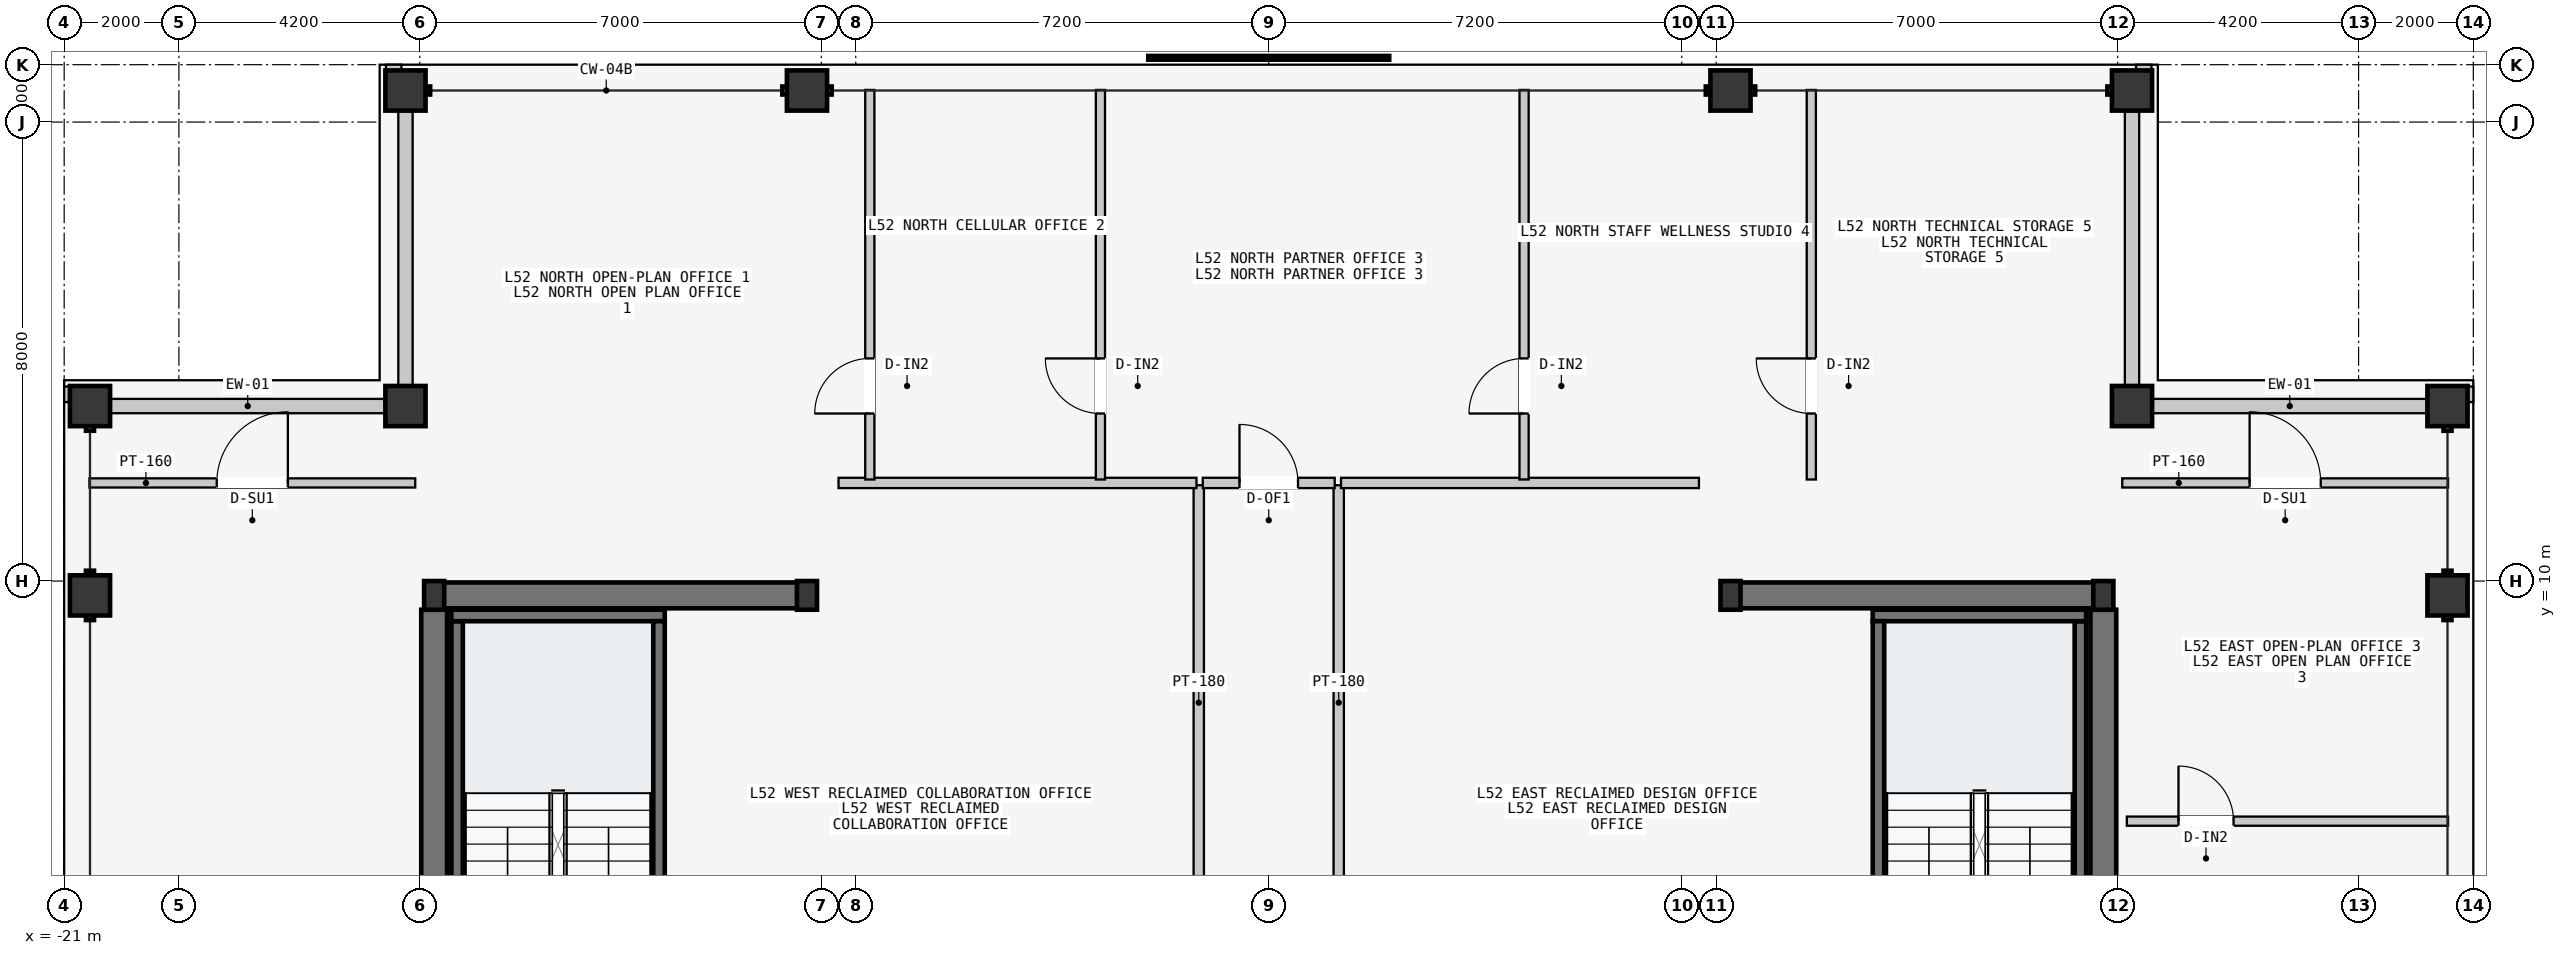
"""IFC4 building model, lengths in metres.
Left out: names, types, materials, properties, quantities, classifications, styles, units other than length and angle.
Written with IfcOpenShell. Run it as: python <this file> out.ifc"""

import sys

from ifc_helpers import new_model, si_unit, direction, frame, frame_2d, origin, origin_2d, place, context, subcontext, project, spatial, rectangle, hollow_rectangle, i_section, extrude, element, fill, save


model = new_model("IFC4")
c1 = context("Model", 3, precision=1e-05, world=origin(), true_north=direction((0.0, 1.0)))
c2 = subcontext(c1, "Body", "Model", "MODEL_VIEW")
j1 = project(units=[si_unit("LENGTHUNIT", "METRE"), si_unit("PLANEANGLEUNIT", "RADIAN")], contexts=[c1])
p1 = place(None, origin())
s1 = spatial("IfcSite", under=j1, at=p1, CompositionType="ELEMENT")
p2 = place(p1, origin())
s2 = spatial("IfcBuilding", under=s1, at=p2, CompositionType="ELEMENT")
p3 = place(p2, frame((0.0, 0.0, 198.3)))
s3 = spatial("IfcBuildingStorey", under=s2, at=p3, CompositionType="ELEMENT", Elevation=198.3)
p4 = place(p3, frame((-14.53, 9.75, -0.2), z_axis=(0.0, 0.0, 1.0), x_axis=(1.0, 0.0, 0.0)))
e1 = element("IfcWall", 1, at=p4, inside=s3, PredefinedType="SHEAR", context=c2, shape_type="SweptSolid", body=[
    extrude(rectangle(XDim=6.46, YDim=0.45, at=frame_2d((3.23, 0.0))), origin(), (0.0, 0.0, 1.0), 3.6),
])
p5 = place(p3, frame((-14.55, 0.25, -0.2), z_axis=(0.0, 0.0, 1.0), x_axis=(0.0, 1.0, 0.0)))
e2 = element("IfcWall", 2, at=p5, inside=s3, PredefinedType="SHEAR", context=c2, shape_type="SweptSolid", body=[
    extrude(rectangle(XDim=9.25, YDim=0.45, at=frame_2d((4.625, 0.0))), origin(), (0.0, 0.0, 1.0), 3.6),
])
p6 = place(p3, frame((8.07, 9.75, -0.2), z_axis=(0.0, 0.0, 1.0), x_axis=(1.0, 0.0, 0.0)))
e3 = element("IfcWall", 3, at=p6, inside=s3, PredefinedType="SHEAR", context=c2, shape_type="SweptSolid", body=[
    extrude(rectangle(XDim=6.46, YDim=0.45, at=frame_2d((3.23, 0.0))), origin(), (0.0, 0.0, 1.0), 3.6),
])
p7 = place(p3, frame((14.55, 0.25, -0.2), z_axis=(0.0, 0.0, 1.0), x_axis=(0.0, 1.0, 0.0)))
e4 = element("IfcWall", 4, at=p7, inside=s3, PredefinedType="SHEAR", context=c2, shape_type="SweptSolid", body=[
    extrude(rectangle(XDim=9.25, YDim=0.45, at=frame_2d((4.625, 0.0))), origin(), (0.0, 0.0, 1.0), 3.6),
])
for number, where, z_axis, x_axis in (
    (5, (-14.15, 1.5, -0.2), (0.0, 0.0, 1.0), (0.0, 1.0, 0.0)),
    (6, (14.15, 1.5, -0.2), (0.0, 0.0, 1.0), (0.0, 1.0, 0.0)),
):
    element("IfcWall", number, at=place(p3, frame(where, z_axis=z_axis, x_axis=x_axis)), inside=s3, PredefinedType="SOLIDWALL", context=c2, shape_type="SweptSolid", body=[
        extrude(rectangle(XDim=7.8, YDim=0.2, at=frame_2d((3.9, 0.0))), origin(), (0.0, 0.0, 1.0), 3.6),
    ])
p8 = place(p3, frame((-14.25, 9.4, -0.2), z_axis=(0.0, 0.0, 1.0), x_axis=(1.0, 0.0, 0.0)))
e7 = element("IfcWall", 7, at=p8, inside=s3, PredefinedType="SOLIDWALL", context=c2, shape_type="SweptSolid", body=[
    extrude(rectangle(XDim=3.72, YDim=0.2, at=frame_2d((1.86, 0.0))), origin(), (0.0, 0.0, 1.0), 3.6),
])
p9 = place(p3, frame((-10.63, 1.5, -0.2), z_axis=(0.0, 0.0, 1.0), x_axis=(0.0, 1.0, 0.0)))
e8 = element("IfcWall", 8, at=p9, inside=s3, PredefinedType="SOLIDWALL", context=c2, shape_type="SweptSolid", body=[
    extrude(rectangle(XDim=7.8, YDim=0.2, at=frame_2d((3.9, 0.0))), origin(), (0.0, 0.0, 1.0), 3.6),
])
p10 = place(p3, frame((10.53, 9.4, -0.2), z_axis=(0.0, 0.0, 1.0), x_axis=(1.0, 0.0, 0.0)))
e9 = element("IfcWall", 9, at=p10, inside=s3, PredefinedType="SOLIDWALL", context=c2, shape_type="SweptSolid", body=[
    extrude(rectangle(XDim=3.72, YDim=0.2, at=frame_2d((1.86, 0.0))), origin(), (0.0, 0.0, 1.0), 3.6),
])
p11 = place(p3, frame((10.63, 1.5, -0.2), z_axis=(0.0, 0.0, 1.0), x_axis=(0.0, 1.0, 0.0)))
e10 = element("IfcWall", 10, at=p11, inside=s3, PredefinedType="SOLIDWALL", context=c2, shape_type="SweptSolid", body=[
    extrude(rectangle(XDim=7.8, YDim=0.2, at=frame_2d((3.9, 0.0))), origin(), (0.0, 0.0, 1.0), 3.6),
])
for number, where, z_axis, x_axis in (
    (11, (-14.55, 9.75, 0.0), (0.0, 0.0, 1.0), (1.0, 0.0, 0.0)),
    (12, (-8.05, 9.75, 0.0), (0.0, 0.0, 1.0), (1.0, 0.0, 0.0)),
    (13, (8.05, 9.75, 0.0), (0.0, 0.0, 1.0), (1.0, 0.0, 0.0)),
    (14, (14.55, 9.75, 0.0), (0.0, 0.0, 1.0), (1.0, 0.0, 0.0)),
):
    element("IfcColumn", number, at=place(p3, frame(where, z_axis=z_axis, x_axis=x_axis)), inside=s3, PredefinedType="COLUMN", context=c2, shape_type="SweptSolid", body=[
        extrude(i_section(OverallWidth=0.35, OverallDepth=0.5, WebThickness=0.02, FlangeThickness=0.032, at=origin_2d()), origin(), (0.0, 0.0, 1.0), 3.6),
    ])
for number, where, z_axis, x_axis in (
    (15, (-15.05, 18.55, 0.0), (0.0, 0.0, 1.0), (1.0, 0.0, 0.0)),
    (16, (-8.05, 18.55, 0.0), (0.0, 0.0, 1.0), (1.0, 0.0, 0.0)),
    (17, (8.05, 18.55, 0.0), (0.0, 0.0, 1.0), (1.0, 0.0, 0.0)),
    (18, (15.05, 18.55, 0.0), (0.0, 0.0, 1.0), (1.0, 0.0, 0.0)),
    (19, (-20.55, 9.75, 0.0), (0.0, 0.0, 1.0), (0.0, 1.0, 0.0)),
    (20, (-20.55, 13.05, 0.0), (0.0, 0.0, 1.0), (0.0, 1.0, 0.0)),
    (21, (20.55, 9.75, 0.0), (0.0, 0.0, 1.0), (0.0, 1.0, 0.0)),
    (22, (20.55, 13.05, 0.0), (0.0, 0.0, 1.0), (0.0, 1.0, 0.0)),
    (23, (-15.05, 13.05, 0.0), (0.0, 0.0, 1.0), (1.0, 0.0, 0.0)),
    (24, (15.05, 13.05, 0.0), (0.0, 0.0, 1.0), (1.0, 0.0, 0.0)),
):
    element("IfcColumn", number, at=place(p3, frame(where, z_axis=z_axis, x_axis=x_axis)), inside=s3, PredefinedType="COLUMN", context=c2, shape_type="SweptSolid", body=[
        extrude(hollow_rectangle(XDim=0.7, YDim=0.7, WallThickness=0.03, at=origin_2d()), origin(), (0.0, 0.0, 1.0), 3.6),
    ])
for number, where, z_axis, x_axis in (
    (25, (-20.19, 13.05, 0.0), (0.0, 0.0, 1.0), (1.0, 0.0, 0.0)),
    (26, (-15.05, 13.41, 0.0), (0.0, 0.0, 1.0), (0.0, 1.0, 0.0)),
    (27, (15.41, 13.05, 0.0), (0.0, 0.0, 1.0), (1.0, 0.0, 0.0)),
    (28, (15.05, 13.41, 0.0), (0.0, 0.0, 1.0), (0.0, 1.0, 0.0)),
):
    element("IfcWall", number, at=place(p3, frame(where, z_axis=z_axis, x_axis=x_axis)), inside=s3, PredefinedType="STANDARD", context=c2, shape_type="SweptSolid", body=[
        extrude(rectangle(XDim=4.78, YDim=0.25, at=frame_2d((2.39, 0.0))), origin(), (0.0, 0.0, 1.0), 2.75),
    ])
for number, where, z_axis, x_axis in (
    (29, (-15.39, 18.89, 0.0), (0.0, 0.0, 1.0), (1.0, 0.0, 0.0)),
    (30, (-20.89, 13.12, 0.0), (0.0, 0.0, 1.0), (0.0, 1.0, 0.0)),
    (31, (15.12, 18.89, 0.0), (0.0, 0.0, 1.0), (1.0, 0.0, 0.0)),
    (32, (20.89, 13.12, 0.0), (0.0, 0.0, 1.0), (0.0, 1.0, 0.0)),
):
    element("IfcWall", number, at=place(p3, frame(where, z_axis=z_axis, x_axis=x_axis)), inside=s3, PredefinedType="PARAPET", context=c2, shape_type="SweptSolid", body=[
        extrude(rectangle(XDim=0.27, YDim=0.22, at=frame_2d((0.135, 0.0))), origin(), (0.0, 0.0, 1.0), 1.2),
    ])
p12 = place(p3, frame((-1.22, -3.5, 0.0), z_axis=(0.0, 0.0, 1.0), x_axis=(0.0, 1.0, 0.0)))
e33 = element("IfcWall", 33, at=p12, inside=s3, PredefinedType="PARTITIONING", context=c2, shape_type="SweptSolid", body=[
    extrude(rectangle(XDim=15.17, YDim=0.18, at=frame_2d((7.585, 0.0))), origin(), (0.0, 0.0, 1.0), 3.4),
])
p13 = place(p12, frame((6.1, 0.0, 0.0)))
e34 = element("IfcOpeningElement", 34, at=p13, cuts=e33, PredefinedType="OPENING", context=c2, shape_type="SweptSolid", body=[
    extrude(rectangle(XDim=1.24, YDim=2.24, at=frame_2d((0.62, 1.12))), frame((0.0, 0.1, 0.0), z_axis=(0.0, -1.0, 0.0), x_axis=(1.0, 0.0, 0.0)), (0.0, 0.0, 1.0), 0.2),
])
p14 = place(p12, frame((1.6, 0.0, 0.0)))
e35 = element("IfcOpeningElement", 35, at=p14, cuts=e33, PredefinedType="OPENING", context=c2, shape_type="SweptSolid", body=[
    extrude(rectangle(XDim=0.96, YDim=2.18, at=frame_2d((0.48, 1.09))), frame((0.0, 0.1, 0.0), z_axis=(0.0, -1.0, 0.0), x_axis=(1.0, 0.0, 0.0)), (0.0, 0.0, 1.0), 0.2),
])
p15 = place(p3, frame((-7.5, 11.71, 0.0), z_axis=(0.0, 0.0, 1.0), x_axis=(1.0, 0.0, 0.0)))
e36 = element("IfcWall", 36, at=p15, inside=s3, PredefinedType="PARTITIONING", context=c2, shape_type="SweptSolid", body=[
    extrude(rectangle(XDim=6.24, YDim=0.18, at=frame_2d((3.12, 0.0))), origin(), (0.0, 0.0, 1.0), 3.4),
])
p16 = place(p3, frame((1.22, -3.5, 0.0), z_axis=(0.0, 0.0, 1.0), x_axis=(0.0, 1.0, 0.0)))
e37 = element("IfcWall", 37, at=p16, inside=s3, PredefinedType="PARTITIONING", context=c2, shape_type="SweptSolid", body=[
    extrude(rectangle(XDim=15.17, YDim=0.18, at=frame_2d((7.585, 0.0))), origin(), (0.0, 0.0, 1.0), 3.4),
])
p17 = place(p16, frame((6.1, 0.0, 0.0)))
e38 = element("IfcOpeningElement", 38, at=p17, cuts=e37, PredefinedType="OPENING", context=c2, shape_type="SweptSolid", body=[
    extrude(rectangle(XDim=1.24, YDim=2.24, at=frame_2d((0.62, 1.12))), frame((0.0, 0.1, 0.0), z_axis=(0.0, -1.0, 0.0), x_axis=(1.0, 0.0, 0.0)), (0.0, 0.0, 1.0), 0.2),
])
p18 = place(p16, frame((1.6, 0.0, 0.0)))
e39 = element("IfcOpeningElement", 39, at=p18, cuts=e37, PredefinedType="OPENING", context=c2, shape_type="SweptSolid", body=[
    extrude(rectangle(XDim=0.96, YDim=2.18, at=frame_2d((0.48, 1.09))), frame((0.0, 0.1, 0.0), z_axis=(0.0, -1.0, 0.0), x_axis=(1.0, 0.0, 0.0)), (0.0, 0.0, 1.0), 0.2),
])
p19 = place(p3, frame((1.26, 11.71, 0.0), z_axis=(0.0, 0.0, 1.0), x_axis=(1.0, 0.0, 0.0)))
e40 = element("IfcWall", 40, at=p19, inside=s3, PredefinedType="PARTITIONING", context=c2, shape_type="SweptSolid", body=[
    extrude(rectangle(XDim=6.24, YDim=0.18, at=frame_2d((3.12, 0.0))), origin(), (0.0, 0.0, 1.0), 3.4),
])
p20 = place(p3, frame((-6.955, 11.77, 0.0), z_axis=(0.0, 0.0, 1.0), x_axis=(0.0, 1.0, 0.0)))
e41 = element("IfcWall", 41, at=p20, inside=s3, PredefinedType="PARTITIONING", context=c2, shape_type="SweptSolid", body=[
    extrude(rectangle(XDim=6.79, YDim=0.16, at=frame_2d((3.395, 0.0))), origin(), (0.0, 0.0, 1.0), 3.4),
])
p21 = place(p20, frame((1.15, 0.0, 0.0)))
e42 = element("IfcOpeningElement", 42, at=p21, cuts=e41, PredefinedType="OPENING", context=c2, shape_type="SweptSolid", body=[
    extrude(rectangle(XDim=0.96, YDim=2.18, at=frame_2d((0.48, 1.09))), frame((0.0, 0.09, 0.0), z_axis=(0.0, -1.0, 0.0), x_axis=(1.0, 0.0, 0.0)), (0.0, 0.0, 1.0), 0.18),
])
p22 = place(p3, frame((-2.935, 11.77, 0.0), z_axis=(0.0, 0.0, 1.0), x_axis=(0.0, 1.0, 0.0)))
e43 = element("IfcWall", 43, at=p22, inside=s3, PredefinedType="PARTITIONING", context=c2, shape_type="SweptSolid", body=[
    extrude(rectangle(XDim=6.79, YDim=0.16, at=frame_2d((3.395, 0.0))), origin(), (0.0, 0.0, 1.0), 3.4),
])
p23 = place(p22, frame((1.15, 0.0, 0.0)))
e44 = element("IfcOpeningElement", 44, at=p23, cuts=e43, PredefinedType="OPENING", context=c2, shape_type="SweptSolid", body=[
    extrude(rectangle(XDim=0.96, YDim=2.18, at=frame_2d((0.48, 1.09))), frame((0.0, 0.09, 0.0), z_axis=(0.0, -1.0, 0.0), x_axis=(1.0, 0.0, 0.0)), (0.0, 0.0, 1.0), 0.18),
])
p24 = place(p3, frame((4.451, 11.77, 0.0), z_axis=(0.0, 0.0, 1.0), x_axis=(0.0, 1.0, 0.0)))
e45 = element("IfcWall", 45, at=p24, inside=s3, PredefinedType="PARTITIONING", context=c2, shape_type="SweptSolid", body=[
    extrude(rectangle(XDim=6.79, YDim=0.16, at=frame_2d((3.395, 0.0))), origin(), (0.0, 0.0, 1.0), 3.4),
])
p25 = place(p24, frame((1.15, 0.0, 0.0)))
e46 = element("IfcOpeningElement", 46, at=p25, cuts=e45, PredefinedType="OPENING", context=c2, shape_type="SweptSolid", body=[
    extrude(rectangle(XDim=0.96, YDim=2.18, at=frame_2d((0.48, 1.09))), frame((0.0, 0.09, 0.0), z_axis=(0.0, -1.0, 0.0), x_axis=(1.0, 0.0, 0.0)), (0.0, 0.0, 1.0), 0.18),
])
p26 = place(p3, frame((9.459, 11.77, 0.0), z_axis=(0.0, 0.0, 1.0), x_axis=(0.0, 1.0, 0.0)))
e47 = element("IfcWall", 47, at=p26, inside=s3, PredefinedType="PARTITIONING", context=c2, shape_type="SweptSolid", body=[
    extrude(rectangle(XDim=6.79, YDim=0.16, at=frame_2d((3.395, 0.0))), origin(), (0.0, 0.0, 1.0), 3.4),
])
p27 = place(p26, frame((1.15, 0.0, 0.0)))
e48 = element("IfcOpeningElement", 48, at=p27, cuts=e47, PredefinedType="OPENING", context=c2, shape_type="SweptSolid", body=[
    extrude(rectangle(XDim=0.96, YDim=2.18, at=frame_2d((0.48, 1.09))), frame((0.0, 0.09, 0.0), z_axis=(0.0, -1.0, 0.0), x_axis=(1.0, 0.0, 0.0)), (0.0, 0.0, 1.0), 0.18),
])
p28 = place(p3, frame((-1.15, 11.71, 0.0), z_axis=(0.0, 0.0, 1.0), x_axis=(1.0, 0.0, 0.0)))
e49 = element("IfcWall", 49, at=p28, inside=s3, PredefinedType="PARTITIONING", context=c2, shape_type="SweptSolid", body=[
    extrude(rectangle(XDim=2.3, YDim=0.18, at=frame_2d((1.15, 0.0))), origin(), (0.0, 0.0, 1.0), 3.4),
])
p29 = place(p28, frame((0.64, 0.0, 0.0)))
e50 = element("IfcOpeningElement", 50, at=p29, cuts=e49, PredefinedType="OPENING", context=c2, shape_type="SweptSolid", body=[
    extrude(rectangle(XDim=1.02, YDim=2.2, at=frame_2d((0.51, 1.1))), frame((0.0, 0.1, 0.0), z_axis=(0.0, -1.0, 0.0), x_axis=(1.0, 0.0, 0.0)), (0.0, 0.0, 1.0), 0.2),
])
p30 = place(p3, frame((-20.56, 11.71, 0.0), z_axis=(0.0, 0.0, 1.0), x_axis=(1.0, 0.0, 0.0)))
e51 = element("IfcWall", 51, at=p30, inside=s3, PredefinedType="PARTITIONING", context=c2, shape_type="SweptSolid", body=[
    extrude(rectangle(XDim=5.68, YDim=0.16, at=frame_2d((2.84, 0.0))), origin(), (0.0, 0.0, 1.0), 3.4),
])
p31 = place(p30, frame((2.22, 0.0, 0.0)))
e52 = element("IfcOpeningElement", 52, at=p31, cuts=e51, PredefinedType="OPENING", context=c2, shape_type="SweptSolid", body=[
    extrude(rectangle(XDim=1.24, YDim=2.24, at=frame_2d((0.62, 1.12))), frame((0.0, 0.09, 0.0), z_axis=(0.0, -1.0, 0.0), x_axis=(1.0, 0.0, 0.0)), (0.0, 0.0, 1.0), 0.18),
])
p32 = place(p3, frame((14.88, 11.71, 0.0), z_axis=(0.0, 0.0, 1.0), x_axis=(1.0, 0.0, 0.0)))
e53 = element("IfcWall", 53, at=p32, inside=s3, PredefinedType="PARTITIONING", context=c2, shape_type="SweptSolid", body=[
    extrude(rectangle(XDim=5.68, YDim=0.16, at=frame_2d((2.84, 0.0))), origin(), (0.0, 0.0, 1.0), 3.4),
])
p33 = place(p32, frame((2.22, 0.0, 0.0)))
e54 = element("IfcOpeningElement", 54, at=p33, cuts=e53, PredefinedType="OPENING", context=c2, shape_type="SweptSolid", body=[
    extrude(rectangle(XDim=1.24, YDim=2.24, at=frame_2d((0.62, 1.12))), frame((0.0, 0.09, 0.0), z_axis=(0.0, -1.0, 0.0), x_axis=(1.0, 0.0, 0.0)), (0.0, 0.0, 1.0), 0.18),
])
p34 = place(p3, frame((14.96, 5.815, 0.0), z_axis=(0.0, 0.0, 1.0), x_axis=(1.0, 0.0, 0.0)))
e55 = element("IfcWall", 55, at=p34, inside=s3, PredefinedType="PARTITIONING", context=c2, shape_type="SweptSolid", body=[
    extrude(rectangle(XDim=5.6, YDim=0.16, at=frame_2d((2.8, 0.0))), origin(), (0.0, 0.0, 1.0), 3.4),
])
p35 = place(p34, frame((0.9, 0.0, 0.0)))
e56 = element("IfcOpeningElement", 56, at=p35, cuts=e55, PredefinedType="OPENING", context=c2, shape_type="SweptSolid", body=[
    extrude(rectangle(XDim=0.96, YDim=2.18, at=frame_2d((0.48, 1.09))), frame((0.0, 0.09, 0.0), z_axis=(0.0, -1.0, 0.0), x_axis=(1.0, 0.0, 0.0)), (0.0, 0.0, 1.0), 0.18),
])
p36 = place(p21, origin())
e57 = element("IfcDoor", 57, at=p36, inside=s3, OperationType="SINGLE_SWING_LEFT", PredefinedType="DOOR", context=c2, shape_type="SweptSolid", body=[
    extrude(rectangle(XDim=0.96, YDim=2.18, at=frame_2d((0.48, 1.09))), frame((0.0, 0.025, 0.0), z_axis=(0.0, -1.0, 0.0), x_axis=(1.0, 0.0, 0.0)), (0.0, 0.0, 1.0), 0.05),
])
fill(e42, e57)
p37 = place(p23, origin())
e58 = element("IfcDoor", 58, at=p37, inside=s3, OperationType="SINGLE_SWING_RIGHT", PredefinedType="DOOR", context=c2, shape_type="SweptSolid", body=[
    extrude(rectangle(XDim=0.96, YDim=2.18, at=frame_2d((0.48, 1.09))), frame((0.0, 0.025, 0.0), z_axis=(0.0, -1.0, 0.0), x_axis=(1.0, 0.0, 0.0)), (0.0, 0.0, 1.0), 0.05),
])
fill(e44, e58)
p38 = place(p25, origin())
e59 = element("IfcDoor", 59, at=p38, inside=s3, OperationType="SINGLE_SWING_LEFT", PredefinedType="DOOR", context=c2, shape_type="SweptSolid", body=[
    extrude(rectangle(XDim=0.96, YDim=2.18, at=frame_2d((0.48, 1.09))), frame((0.0, 0.025, 0.0), z_axis=(0.0, -1.0, 0.0), x_axis=(1.0, 0.0, 0.0)), (0.0, 0.0, 1.0), 0.05),
])
fill(e46, e59)
p39 = place(p27, origin())
e60 = element("IfcDoor", 60, at=p39, inside=s3, OperationType="SINGLE_SWING_RIGHT", PredefinedType="DOOR", context=c2, shape_type="SweptSolid", body=[
    extrude(rectangle(XDim=0.96, YDim=2.18, at=frame_2d((0.48, 1.09))), frame((0.0, 0.025, 0.0), z_axis=(0.0, -1.0, 0.0), x_axis=(1.0, 0.0, 0.0)), (0.0, 0.0, 1.0), 0.05),
])
fill(e48, e60)
p40 = place(p29, origin())
e61 = element("IfcDoor", 61, at=p40, inside=s3, OperationType="SINGLE_SWING_LEFT", PredefinedType="DOOR", context=c2, shape_type="SweptSolid", body=[
    extrude(rectangle(XDim=1.02, YDim=2.2, at=frame_2d((0.51, 1.1))), frame((0.0, 0.025, 0.0), z_axis=(0.0, -1.0, 0.0), x_axis=(1.0, 0.0, 0.0)), (0.0, 0.0, 1.0), 0.05),
])
fill(e50, e61)
p41 = place(p31, origin())
e62 = element("IfcDoor", 62, at=p41, inside=s3, OperationType="SINGLE_SWING_RIGHT", PredefinedType="DOOR", context=c2, shape_type="SweptSolid", body=[
    extrude(rectangle(XDim=1.24, YDim=2.24, at=frame_2d((0.62, 1.12))), frame((0.0, 0.025, 0.0), z_axis=(0.0, -1.0, 0.0), x_axis=(1.0, 0.0, 0.0)), (0.0, 0.0, 1.0), 0.05),
])
fill(e52, e62)
p42 = place(p33, origin())
e63 = element("IfcDoor", 63, at=p42, inside=s3, OperationType="SINGLE_SWING_LEFT", PredefinedType="DOOR", context=c2, shape_type="SweptSolid", body=[
    extrude(rectangle(XDim=1.24, YDim=2.24, at=frame_2d((0.62, 1.12))), frame((0.0, 0.025, 0.0), z_axis=(0.0, -1.0, 0.0), x_axis=(1.0, 0.0, 0.0)), (0.0, 0.0, 1.0), 0.05),
])
fill(e54, e63)
p43 = place(p35, origin())
e64 = element("IfcDoor", 64, at=p43, inside=s3, OperationType="SINGLE_SWING_LEFT", PredefinedType="DOOR", context=c2, shape_type="SweptSolid", body=[
    extrude(rectangle(XDim=0.96, YDim=2.18, at=frame_2d((0.48, 1.09))), frame((0.0, 0.025, 0.0), z_axis=(0.0, -1.0, 0.0), x_axis=(1.0, 0.0, 0.0)), (0.0, 0.0, 1.0), 0.05),
])
fill(e56, e64)
save(model, sys.argv[1])
